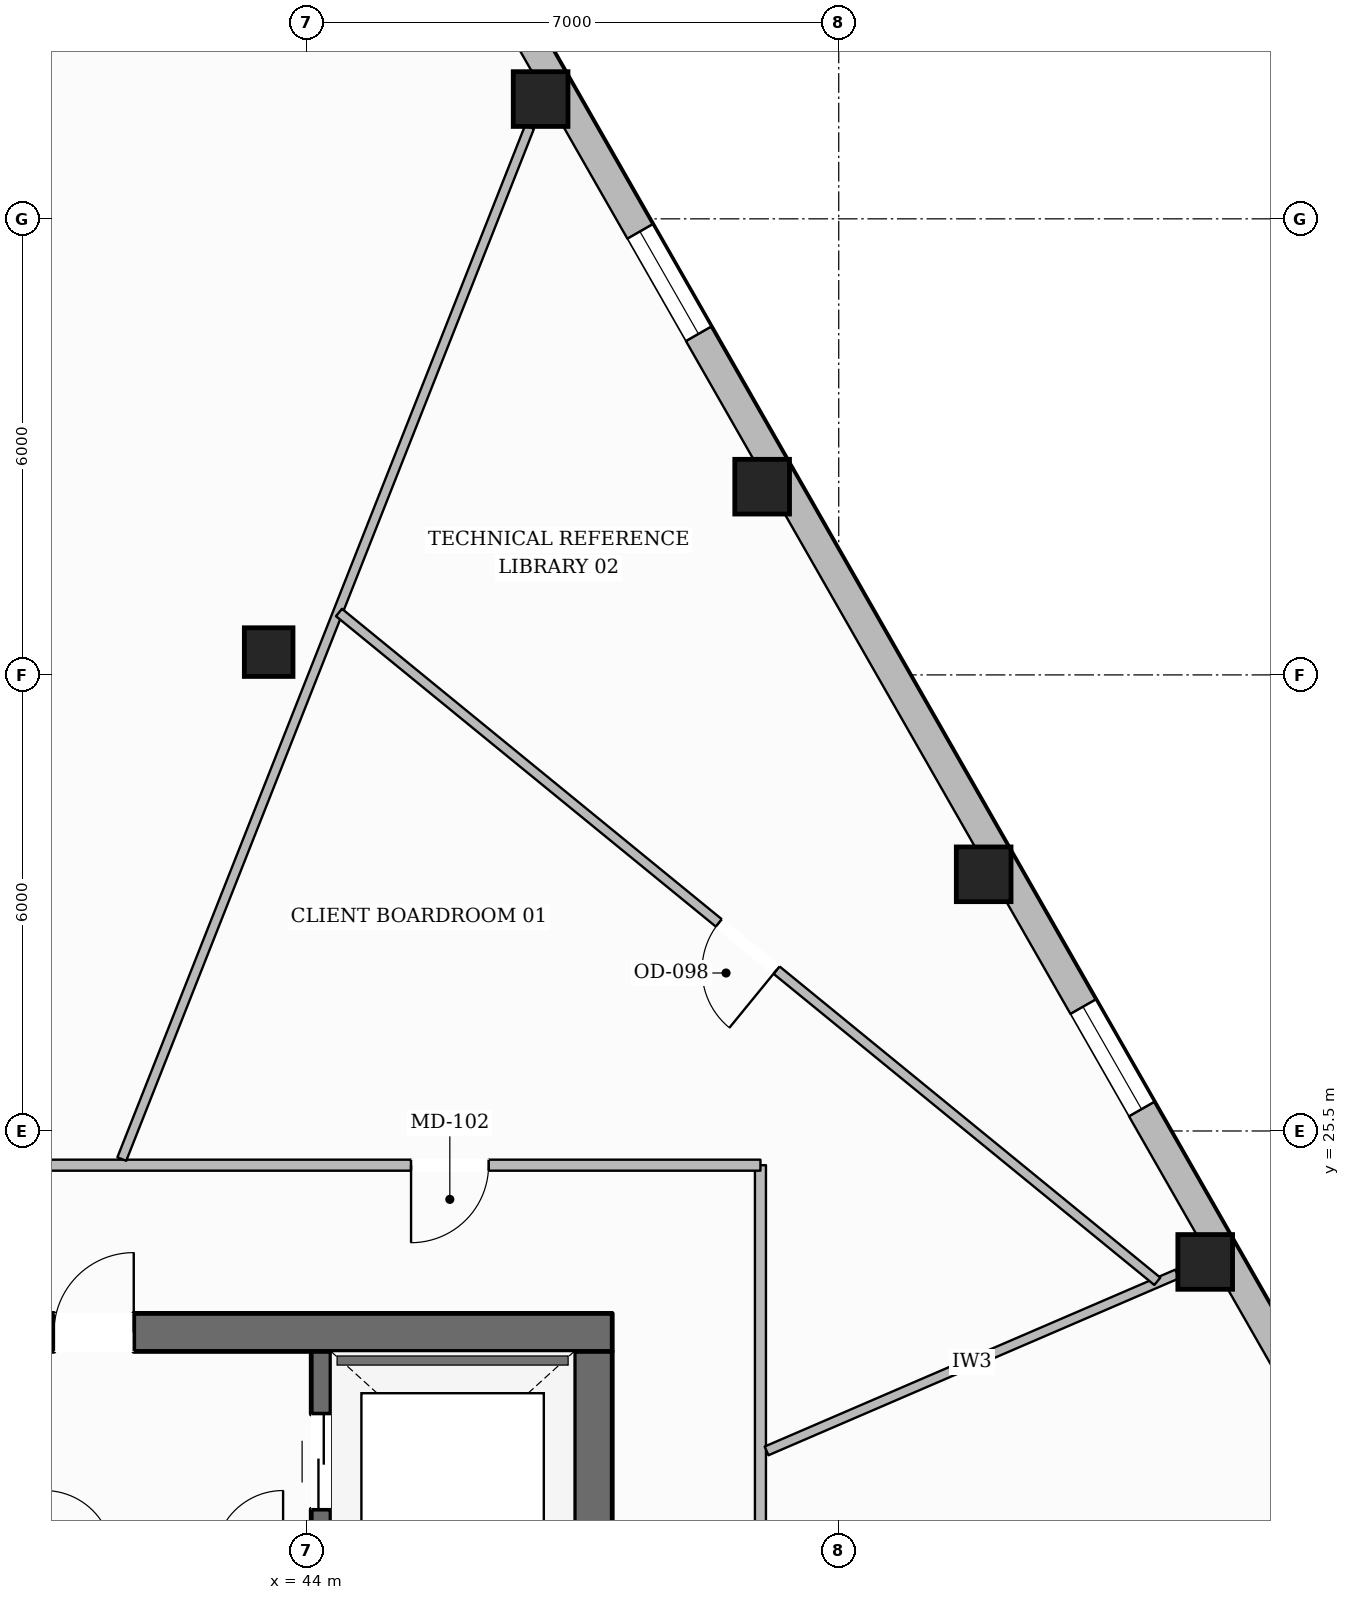
"""IFC4 building model, lengths in metres.
Left out: names, types, materials, properties, quantities, classifications, styles, units other than length and angle.
Written with IfcOpenShell. Run it as: python <this file> out.ifc"""

import sys

from ifc_helpers import new_model, si_unit, direction, frame, frame_2d, origin, origin_2d, place, context, subcontext, project, spatial, rectangle, hollow_rectangle, extrude, element, fill, save


model = new_model("IFC4")
c1 = context("Model", 3, precision=1e-05, world=origin(), true_north=direction((0.0, 1.0)))
c2 = subcontext(c1, "Body", "Model", "MODEL_VIEW")
j1 = project(units=[si_unit("LENGTHUNIT", "METRE"), si_unit("PLANEANGLEUNIT", "RADIAN")], contexts=[c1])
p1 = place(None, origin())
s1 = spatial("IfcSite", under=j1, at=p1, CompositionType="ELEMENT")
p2 = place(p1, origin())
s2 = spatial("IfcBuilding", under=s1, at=p2, CompositionType="ELEMENT")
p3 = place(p2, frame((0.0, 0.0, 97.05)))
s3 = spatial("IfcBuildingStorey", under=s2, at=p3, CompositionType="ELEMENT", Elevation=97.05)
p4 = place(p3, frame((27.98, 22.85, 0.0), z_axis=(0.0, 0.0, 1.0), x_axis=(1.0, 0.0, 0.0)))
e1 = element("IfcWall", 1, at=p4, inside=s3, PredefinedType="SOLIDWALL", context=c2, shape_type="SweptSolid", body=[
    extrude(rectangle(XDim=20.04, YDim=0.5, at=frame_2d((10.02, 0.0))), origin(), (0.0, 0.0, 1.0), 3.6),
])
p5 = place(p4, frame((6.295, 0.0, 0.0)))
e2 = element("IfcOpeningElement", 2, at=p5, cuts=e1, PredefinedType="OPENING", context=c2, shape_type="SweptSolid", body=[
    extrude(rectangle(XDim=1.05, YDim=2.15, at=frame_2d((0.525, 1.075))), frame((0.0, 0.26, 0.0), z_axis=(0.0, -1.0, 0.0), x_axis=(1.0, 0.0, 0.0)), (0.0, 0.0, 1.0), 0.52),
])
p6 = place(p4, frame((12.695, 0.0, 0.0)))
e3 = element("IfcOpeningElement", 3, at=p6, cuts=e1, PredefinedType="OPENING", context=c2, shape_type="SweptSolid", body=[
    extrude(rectangle(XDim=1.05, YDim=2.15, at=frame_2d((0.525, 1.075))), frame((0.0, 0.26, 0.0), z_axis=(0.0, -1.0, 0.0), x_axis=(1.0, 0.0, 0.0)), (0.0, 0.0, 1.0), 0.52),
])
p7 = place(p3, frame((47.77, 9.6, 0.0), z_axis=(0.0, 0.0, 1.0), x_axis=(0.0, 1.0, 0.0)))
e4 = element("IfcWall", 4, at=p7, inside=s3, PredefinedType="SOLIDWALL", context=c2, shape_type="SweptSolid", body=[
    extrude(rectangle(XDim=13.0, YDim=0.5, at=frame_2d((6.5, 0.0))), origin(), (0.0, 0.0, 1.0), 3.6),
])
p8 = place(p7, frame((0.2, 0.0, 0.0)))
e5 = element("IfcOpeningElement", 5, at=p8, cuts=e4, PredefinedType="OPENING", context=c2, shape_type="SweptSolid", body=[
    extrude(rectangle(XDim=1.1, YDim=2.15, at=frame_2d((0.55, 1.075))), frame((0.0, 0.26, 0.0), z_axis=(0.0, -1.0, 0.0), x_axis=(1.0, 0.0, 0.0)), (0.0, 0.0, 1.0), 0.52),
])
p9 = place(p7, frame((8.4, 0.0, 0.0)))
e6 = element("IfcOpeningElement", 6, at=p9, cuts=e4, PredefinedType="OPENING", context=c2, shape_type="SweptSolid", body=[
    extrude(rectangle(XDim=0.9, YDim=2.1, at=frame_2d((0.45, 1.05))), frame((0.0, 0.26, 0.0), z_axis=(0.0, -1.0, 0.0), x_axis=(1.0, 0.0, 0.0)), (0.0, 0.0, 1.0), 0.52),
])
p10 = place(p3, frame((44.19, 9.6, 0.0), z_axis=(0.0, 0.0, 1.0), x_axis=(0.0, 1.0, 0.0)))
e7 = element("IfcWall", 7, at=p10, inside=s3, PredefinedType="SHEAR", context=c2, shape_type="SweptSolid", body=[
    extrude(rectangle(XDim=13.0, YDim=0.26, at=frame_2d((6.5, 0.0))), origin(), (0.0, 0.0, 1.0), 3.6),
])
p11 = place(p10, frame((10.925, 0.0, 0.0)))
e8 = element("IfcOpeningElement", 8, at=p11, cuts=e7, PredefinedType="OPENING", context=c2, shape_type="SweptSolid", body=[
    extrude(rectangle(XDim=1.25, YDim=2.25, at=frame_2d((0.625, 1.125))), frame((0.0, 0.14, 0.0), z_axis=(0.0, -1.0, 0.0), x_axis=(1.0, 0.0, 0.0)), (0.0, 0.0, 1.0), 0.28),
])
for number, where, z_axis, x_axis in (
    (9, (55.821, 23.777, 0.0), (0.0, 0.0, 1.0), (1.0, 0.0, 0.0)),
    (10, (52.907, 28.877, 0.0), (0.0, 0.0, 1.0), (1.0, 0.0, 0.0)),
    (11, (49.992, 33.976, 0.0), (0.0, 0.0, 1.0), (1.0, 0.0, 0.0)),
    (12, (47.078, 39.076, 0.0), (0.0, 0.0, 1.0), (1.0, 0.0, 0.0)),
):
    element("IfcColumn", number, at=place(p3, frame(where, z_axis=z_axis, x_axis=x_axis)), inside=s3, PredefinedType="COLUMN", context=c2, shape_type="SweptSolid", body=[
        extrude(hollow_rectangle(XDim=0.72, YDim=0.72, WallThickness=0.032, at=origin_2d()), origin(), (0.0, 0.0, 1.0), 3.6),
    ])
p12 = place(p3, frame((43.5, 31.8, 0.0), z_axis=(0.0, 0.0, 1.0), x_axis=(1.0, 0.0, 0.0)))
e13 = element("IfcColumn", 13, at=p12, inside=s3, PredefinedType="COLUMN", context=c2, shape_type="SweptSolid", body=[
    extrude(hollow_rectangle(XDim=0.64, YDim=0.64, WallThickness=0.028, at=origin_2d()), origin(), (0.0, 0.0, 1.0), 3.6),
])
p13 = place(p3, frame((44.161, 44.724, 0.0), z_axis=(0.0, 0.0, 1.0), x_axis=(0.496205042728, -0.86820536486, 0.0)))
e14 = element("IfcWall", 14, at=p13, inside=s3, PredefinedType="STANDARD", context=c2, shape_type="SweptSolid", body=[
    extrude(rectangle(XDim=36.193, YDim=0.38, at=frame_2d((18.097, 0.0))), origin(), (0.0, 0.0, 1.0), 3.059),
])
p14 = place(p13, frame((32.008, 0.0, 0.65)))
e15 = element("IfcOpeningElement", 15, at=p14, cuts=e14, PredefinedType="OPENING", context=c2, shape_type="SweptSolid", body=[
    extrude(rectangle(XDim=1.55, YDim=1.75, at=frame_2d((0.775, 0.875))), frame((0.0, 0.2, 0.0), z_axis=(0.0, -1.0, 0.0), x_axis=(1.0, 0.0, 0.0)), (0.0, 0.0, 1.0), 0.4),
])
p15 = place(p13, frame((26.134, 0.0, 0.65)))
e16 = element("IfcOpeningElement", 16, at=p15, cuts=e14, PredefinedType="OPENING", context=c2, shape_type="SweptSolid", body=[
    extrude(rectangle(XDim=1.55, YDim=1.75, at=frame_2d((0.775, 0.875))), frame((0.0, 0.2, 0.0), z_axis=(0.0, -1.0, 0.0), x_axis=(1.0, 0.0, 0.0)), (0.0, 0.0, 1.0), 0.4),
])
p16 = place(p13, frame((20.26, 0.0, 0.65)))
e17 = element("IfcOpeningElement", 17, at=p16, cuts=e14, PredefinedType="OPENING", context=c2, shape_type="SweptSolid", body=[
    extrude(rectangle(XDim=1.55, YDim=1.75, at=frame_2d((0.775, 0.875))), frame((0.0, 0.2, 0.0), z_axis=(0.0, -1.0, 0.0), x_axis=(1.0, 0.0, 0.0)), (0.0, 0.0, 1.0), 0.4),
])
p17 = place(p13, frame((8.513, 0.0, 0.65)))
e18 = element("IfcOpeningElement", 18, at=p17, cuts=e14, PredefinedType="OPENING", context=c2, shape_type="SweptSolid", body=[
    extrude(rectangle(XDim=1.55, YDim=1.75, at=frame_2d((0.775, 0.875))), frame((0.0, 0.2, 0.0), z_axis=(0.0, -1.0, 0.0), x_axis=(1.0, 0.0, 0.0)), (0.0, 0.0, 1.0), 0.4),
])
p18 = place(p13, frame((2.639, 0.0, 0.65)))
e19 = element("IfcOpeningElement", 19, at=p18, cuts=e14, PredefinedType="OPENING", context=c2, shape_type="SweptSolid", body=[
    extrude(rectangle(XDim=1.55, YDim=1.75, at=frame_2d((0.775, 0.875))), frame((0.0, 0.2, 0.0), z_axis=(0.0, -1.0, 0.0), x_axis=(1.0, 0.0, 0.0)), (0.0, 0.0, 1.0), 0.4),
])
p19 = place(p3, frame((49.97, 7.15, 0.0), z_axis=(0.0, 0.0, 1.0), x_axis=(0.0, 1.0, 0.0)))
e20 = element("IfcWall", 20, at=p19, inside=s3, PredefinedType="PARTITIONING", context=c2, shape_type="SweptSolid", body=[
    extrude(rectangle(XDim=17.9, YDim=0.145, at=frame_2d((8.95, 0.0))), origin(), (0.0, 0.0, 1.0), 3.288),
])
p20 = place(p19, frame((6.454, 0.0, 0.0)))
e21 = element("IfcOpeningElement", 21, at=p20, cuts=e20, PredefinedType="OPENING", context=c2, shape_type="SweptSolid", body=[
    extrude(rectangle(XDim=1.4, YDim=2.2, at=frame_2d((0.7, 1.1))), frame((0.0, 0.083, 0.0), z_axis=(0.0, -1.0, 0.0), x_axis=(1.0, 0.0, 0.0)), (0.0, 0.0, 1.0), 0.165),
])
p21 = place(p3, frame((49.97, 25.05, 0.0), z_axis=(0.0, 0.0, 1.0), x_axis=(-1.0, 0.0, 0.0)))
e22 = element("IfcWall", 22, at=p21, inside=s3, PredefinedType="PARTITIONING", context=c2, shape_type="SweptSolid", body=[
    extrude(rectangle(XDim=23.94, YDim=0.145, at=frame_2d((11.97, 0.0))), origin(), (0.0, 0.0, 1.0), 3.6),
])
p22 = place(p21, frame((3.577, 0.0, 0.0)))
e23 = element("IfcOpeningElement", 23, at=p22, cuts=e22, PredefinedType="OPENING", context=c2, shape_type="SweptSolid", body=[
    extrude(rectangle(XDim=1.02, YDim=2.15, at=frame_2d((0.51, 1.075))), frame((0.0, 0.083, 0.0), z_axis=(0.0, -1.0, 0.0), x_axis=(1.0, 0.0, 0.0)), (0.0, 0.0, 1.0), 0.165),
])
p23 = place(p21, frame((12.451, 0.0, 0.0)))
e24 = element("IfcOpeningElement", 24, at=p23, cuts=e22, PredefinedType="OPENING", context=c2, shape_type="SweptSolid", body=[
    extrude(rectangle(XDim=1.4, YDim=2.2, at=frame_2d((0.7, 1.1))), frame((0.0, 0.083, 0.0), z_axis=(0.0, -1.0, 0.0), x_axis=(1.0, 0.0, 0.0)), (0.0, 0.0, 1.0), 0.165),
])
p24 = place(p3, frame((50.051, 21.291, 0.0), z_axis=(0.0, 0.0, 1.0), x_axis=(0.918411455874, 0.395626588741, 0.0)))
e25 = element("IfcWall", 25, at=p24, inside=s3, PredefinedType="PARTITIONING", context=c2, shape_type="SweptSolid", body=[
    extrude(rectangle(XDim=5.883, YDim=0.125, at=frame_2d((2.941, 0.0))), origin(), (0.0, 0.0, 1.0), 3.141),
])
p25 = place(p3, frame((41.568, 25.131, 0.0), z_axis=(0.0, 0.0, 1.0), x_axis=(0.36746312835, 0.930038090243, 0.0)))
e26 = element("IfcWall", 26, at=p25, inside=s3, PredefinedType="PARTITIONING", context=c2, shape_type="SweptSolid", body=[
    extrude(rectangle(XDim=14.599, YDim=0.125, at=frame_2d((7.299, 0.0))), origin(), (0.0, 0.0, 1.0), 3.141),
])
p26 = place(p3, frame((55.191, 23.522, 0.0), z_axis=(0.0, 0.0, 1.0), x_axis=(-0.774294364682, 0.632825597476, 0.0)))
e27 = element("IfcWall", 27, at=p26, inside=s3, PredefinedType="PARTITIONING", context=c2, shape_type="SweptSolid", body=[
    extrude(rectangle(XDim=13.905, YDim=0.125, at=frame_2d((6.952, 0.0))), origin(), (0.0, 0.0, 1.0), 3.288),
])
p27 = place(p26, frame((6.47, 0.0, 0.0)))
e28 = element("IfcOpeningElement", 28, at=p27, cuts=e27, PredefinedType="OPENING", context=c2, shape_type="SweptSolid", body=[
    extrude(rectangle(XDim=0.98, YDim=2.15, at=frame_2d((0.49, 1.075))), frame((0.0, 0.073, 0.0), z_axis=(0.0, -1.0, 0.0), x_axis=(1.0, 0.0, 0.0)), (0.0, 0.0, 1.0), 0.145),
])
p28 = place(p3, frame((49.001, 2.722, 0.0), z_axis=(0.0, 0.0, 1.0), x_axis=(0.404423778169, 0.914571707222, 0.0)))
e29 = element("IfcWall", 29, at=p28, inside=s3, PredefinedType="PARTITIONING", context=c2, shape_type="SweptSolid", body=[
    extrude(rectangle(XDim=20.485, YDim=0.125, at=frame_2d((10.243, 0.0))), origin(), (0.0, 0.0, 1.0), 3.6),
])
p29 = place(p28, frame((9.752, 0.0, 0.0)))
e30 = element("IfcOpeningElement", 30, at=p29, cuts=e29, PredefinedType="OPENING", context=c2, shape_type="SweptSolid", body=[
    extrude(rectangle(XDim=0.98, YDim=2.15, at=frame_2d((0.49, 1.075))), frame((0.0, 0.073, 0.0), z_axis=(0.0, -1.0, 0.0), x_axis=(1.0, 0.0, 0.0)), (0.0, 0.0, 1.0), 0.145),
])
p30 = place(p16, origin())
e31 = element("IfcWindow", 31, at=p30, inside=s3, PartitioningType="SINGLE_PANEL", PredefinedType="WINDOW", context=c2, shape_type="SweptSolid", body=[
    extrude(rectangle(XDim=1.55, YDim=1.75, at=frame_2d((0.775, 0.875))), frame((0.0, 0.03, 0.0), z_axis=(0.0, -1.0, 0.0), x_axis=(1.0, 0.0, 0.0)), (0.0, 0.0, 1.0), 0.06),
])
fill(e17, e31)
p31 = place(p17, origin())
e32 = element("IfcWindow", 32, at=p31, inside=s3, PartitioningType="SINGLE_PANEL", PredefinedType="WINDOW", context=c2, shape_type="SweptSolid", body=[
    extrude(rectangle(XDim=1.55, YDim=1.75, at=frame_2d((0.775, 0.875))), frame((0.0, 0.03, 0.0), z_axis=(0.0, -1.0, 0.0), x_axis=(1.0, 0.0, 0.0)), (0.0, 0.0, 1.0), 0.06),
])
fill(e18, e32)
p32 = place(p6, origin())
e33 = element("IfcDoor", 33, at=p32, inside=s3, OperationType="SINGLE_SWING_RIGHT", PredefinedType="DOOR", context=c2, shape_type="SweptSolid", body=[
    extrude(rectangle(XDim=1.05, YDim=2.15, at=frame_2d((0.525, 1.075))), frame((0.0, 0.025, 0.0), z_axis=(0.0, -1.0, 0.0), x_axis=(1.0, 0.0, 0.0)), (0.0, 0.0, 1.0), 0.05),
])
fill(e3, e33)
p33 = place(p11, origin())
e34 = element("IfcDoor", 34, at=p33, inside=s3, OperationType="DOUBLE_DOOR_SLIDING", PredefinedType="DOOR", context=c2, shape_type="SweptSolid", body=[
    extrude(rectangle(XDim=1.25, YDim=2.25, at=frame_2d((0.625, 1.125))), frame((0.0, 0.025, 0.0), z_axis=(0.0, -1.0, 0.0), x_axis=(1.0, 0.0, 0.0)), (0.0, 0.0, 1.0), 0.05),
])
fill(e8, e34)
p34 = place(p22, origin())
e35 = element("IfcDoor", 35, at=p34, inside=s3, OperationType="SINGLE_SWING_RIGHT", PredefinedType="DOOR", context=c2, shape_type="SweptSolid", body=[
    extrude(rectangle(XDim=1.02, YDim=2.15, at=frame_2d((0.51, 1.075))), frame((0.0, 0.025, 0.0), z_axis=(0.0, -1.0, 0.0), x_axis=(1.0, 0.0, 0.0)), (0.0, 0.0, 1.0), 0.05),
])
fill(e23, e35)
p35 = place(p27, origin())
e36 = element("IfcDoor", 36, at=p35, inside=s3, OperationType="SINGLE_SWING_LEFT", PredefinedType="DOOR", context=c2, shape_type="SweptSolid", body=[
    extrude(rectangle(XDim=0.98, YDim=2.15, at=frame_2d((0.49, 1.075))), frame((0.0, 0.025, 0.0), z_axis=(0.0, -1.0, 0.0), x_axis=(1.0, 0.0, 0.0)), (0.0, 0.0, 1.0), 0.05),
])
fill(e28, e36)
save(model, sys.argv[1])
